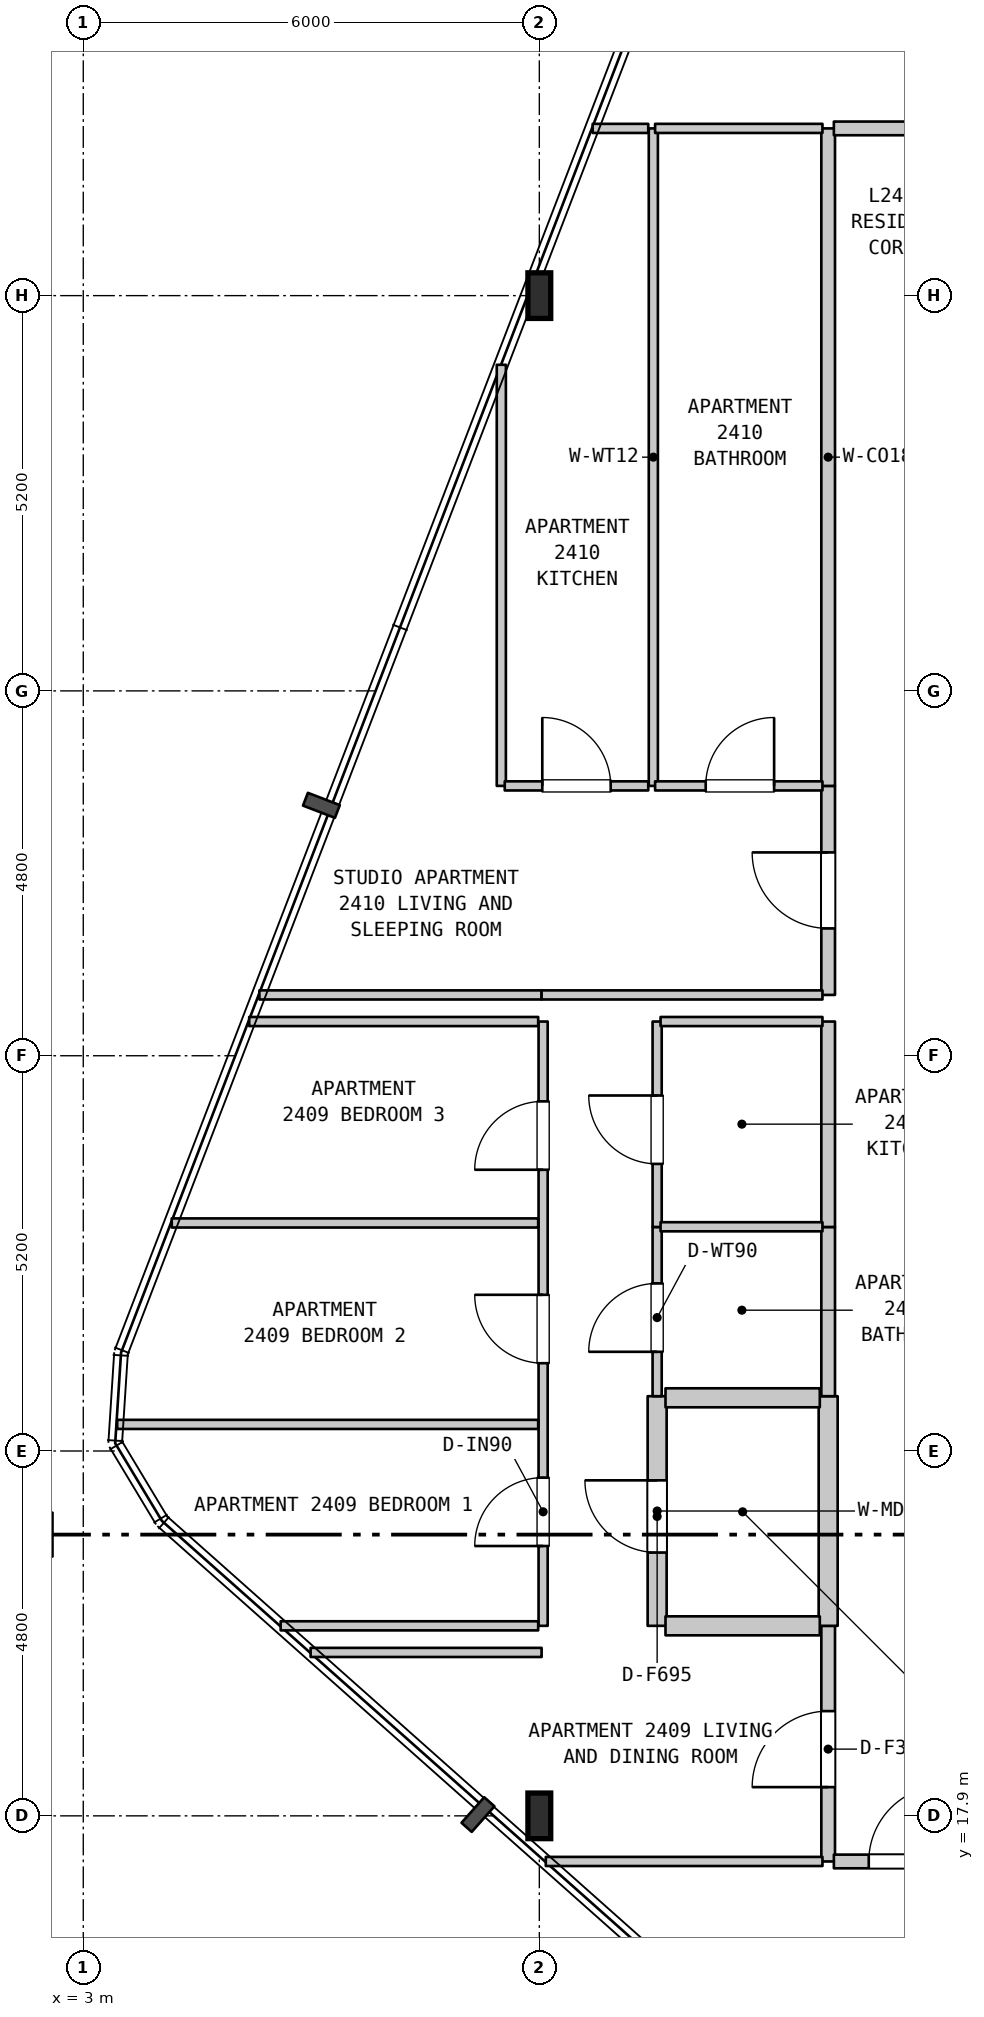
"""IFC4 building model, lengths in metres.
Left out: names, types, materials, properties, quantities, classifications, styles, units other than length and angle.
Written with IfcOpenShell. Run it as: python <this file> out.ifc"""

import sys

from ifc_helpers import new_model, si_unit, direction, frame, frame_2d, origin, origin_2d, place, context, subcontext, project, spatial, rectangle, i_section, extrude, element, fill, save


model = new_model("IFC4")
c1 = context("Model", 3, precision=1e-05, world=origin(), true_north=direction((0.0, 1.0)))
c2 = subcontext(c1, "Body", "Model", "MODEL_VIEW")
j1 = project(units=[si_unit("LENGTHUNIT", "METRE"), si_unit("PLANEANGLEUNIT", "RADIAN")], contexts=[c1])
p1 = place(None, origin())
s1 = spatial("IfcSite", under=j1, at=p1, CompositionType="ELEMENT")
p2 = place(p1, origin())
s2 = spatial("IfcBuilding", under=s1, at=p2, CompositionType="ELEMENT")
p3 = place(p2, frame((0.0, 0.0, 102.0)))
s3 = spatial("IfcBuildingStorey", under=s2, at=p3, CompositionType="ELEMENT", Elevation=102.0)
for number, where, z_axis, x_axis in (
    (1, (9.0, 17.9, 0.0), (0.0, 0.0, 1.0), (1.0, 0.0, 0.0)),
    (2, (9.0, 37.9, 0.0), (0.0, 0.0, 1.0), (1.0, 0.0, 0.0)),
):
    element("IfcColumn", number, at=place(p3, frame(where, z_axis=z_axis, x_axis=x_axis)), inside=s3, PredefinedType="COLUMN", context=c2, shape_type="SweptSolid", body=[
        extrude(i_section(OverallWidth=0.3, OverallDepth=0.6, WebThickness=0.015, FlangeThickness=0.03, FilletRadius=0.027, at=origin_2d()), origin(), (0.0, 0.0, 1.0), 3.7),
    ])
p4 = place(p3, frame((8.5, 31.45, 0.0), z_axis=(0.0, 0.0, 1.0), x_axis=(0.0, 1.0, 0.0)))
e3 = element("IfcWall", 3, at=p4, inside=s3, PredefinedType="PARTITIONING", context=c2, shape_type="SweptSolid", body=[
    extrude(rectangle(XDim=5.54, YDim=0.12, at=frame_2d((2.77, 0.0))), origin(), (0.0, 0.0, 1.0), 3.385),
])
p5 = place(p3, frame((9.05, 20.4, 0.0), z_axis=(0.0, 0.0, 1.0), x_axis=(0.0, 1.0, 0.0)))
e4 = element("IfcWall", 4, at=p5, inside=s3, PredefinedType="PARTITIONING", context=c2, shape_type="SweptSolid", body=[
    extrude(rectangle(XDim=7.95, YDim=0.12, at=frame_2d((3.975, 0.0))), origin(), (0.0, 0.0, 1.0), 2.785),
])
p6 = place(p5, frame((1.05, 0.0, 0.0)))
e5 = element("IfcOpeningElement", 5, at=p6, cuts=e4, PredefinedType="OPENING", context=c2, shape_type="SweptSolid", body=[
    extrude(rectangle(XDim=0.9, YDim=2.15, at=frame_2d((0.45, 1.075))), frame((0.0, 0.07, 0.0), z_axis=(0.0, -1.0, 0.0), x_axis=(1.0, 0.0, 0.0)), (0.0, 0.0, 1.0), 0.14),
])
p7 = place(p5, frame((3.455, 0.0, 0.0)))
e6 = element("IfcOpeningElement", 6, at=p7, cuts=e4, PredefinedType="OPENING", context=c2, shape_type="SweptSolid", body=[
    extrude(rectangle(XDim=0.9, YDim=2.15, at=frame_2d((0.45, 1.075))), frame((0.0, 0.07, 0.0), z_axis=(0.0, -1.0, 0.0), x_axis=(1.0, 0.0, 0.0)), (0.0, 0.0, 1.0), 0.14),
])
p8 = place(p5, frame((6.0, 0.0, 0.0)))
e7 = element("IfcOpeningElement", 7, at=p8, cuts=e4, PredefinedType="OPENING", context=c2, shape_type="SweptSolid", body=[
    extrude(rectangle(XDim=0.9, YDim=2.15, at=frame_2d((0.45, 1.075))), frame((0.0, 0.07, 0.0), z_axis=(0.0, -1.0, 0.0), x_axis=(1.0, 0.0, 0.0)), (0.0, 0.0, 1.0), 0.14),
])
p9 = place(p3, frame((10.5, 31.45, 0.0), z_axis=(0.0, 0.0, 1.0), x_axis=(0.0, 1.0, 0.0)))
e8 = element("IfcWall", 8, at=p9, inside=s3, PredefinedType="PARTITIONING", context=c2, shape_type="SweptSolid", body=[
    extrude(rectangle(XDim=8.65, YDim=0.12, at=frame_2d((4.325, 0.0))), origin(), (0.0, 0.0, 1.0), 3.385),
])
p10 = place(p3, frame((10.55, 20.4, 0.0), z_axis=(0.0, 0.0, 1.0), x_axis=(0.0, 1.0, 0.0)))
e9 = element("IfcWall", 9, at=p10, inside=s3, PredefinedType="STANDARD", context=c2, shape_type="SweptSolid", body=[
    extrude(rectangle(XDim=3.021, YDim=0.25, at=frame_2d((1.51, 0.0))), origin(), (0.0, 0.0, 1.0), 3.385),
])
p11 = place(p10, frame((0.964, 0.0, 0.0)))
e10 = element("IfcOpeningElement", 10, at=p11, cuts=e9, PredefinedType="OPENING", context=c2, shape_type="SweptSolid", body=[
    extrude(rectangle(XDim=0.95, YDim=2.15, at=frame_2d((0.475, 1.075))), frame((0.0, 0.135, 0.0), z_axis=(0.0, -1.0, 0.0), x_axis=(1.0, 0.0, 0.0)), (0.0, 0.0, 1.0), 0.27),
])
p12 = place(p3, frame((10.55, 23.421, 0.0), z_axis=(0.0, 0.0, 1.0), x_axis=(0.0, 1.0, 0.0)))
e11 = element("IfcWall", 11, at=p12, inside=s3, PredefinedType="PARTITIONING", context=c2, shape_type="SweptSolid", body=[
    extrude(rectangle(XDim=2.226, YDim=0.12, at=frame_2d((1.113, 0.0))), origin(), (0.0, 0.0, 1.0), 3.385),
])
p13 = place(p12, frame((0.584, 0.0, 0.0)))
e12 = element("IfcOpeningElement", 12, at=p13, cuts=e11, PredefinedType="OPENING", context=c2, shape_type="SweptSolid", body=[
    extrude(rectangle(XDim=0.9, YDim=2.1, at=frame_2d((0.45, 1.05))), frame((0.0, 0.07, 0.0), z_axis=(0.0, -1.0, 0.0), x_axis=(1.0, 0.0, 0.0)), (0.0, 0.0, 1.0), 0.14),
])
p14 = place(p3, frame((10.55, 25.647, 0.0), z_axis=(0.0, 0.0, 1.0), x_axis=(0.0, 1.0, 0.0)))
e13 = element("IfcWall", 13, at=p14, inside=s3, PredefinedType="PARTITIONING", context=c2, shape_type="SweptSolid", body=[
    extrude(rectangle(XDim=2.703, YDim=0.12, at=frame_2d((1.352, 0.0))), origin(), (0.0, 0.0, 1.0), 3.385),
])
p15 = place(p14, frame((0.83, 0.0, 0.0)))
e14 = element("IfcOpeningElement", 14, at=p15, cuts=e13, PredefinedType="OPENING", context=c2, shape_type="SweptSolid", body=[
    extrude(rectangle(XDim=0.9, YDim=2.15, at=frame_2d((0.45, 1.075))), frame((0.0, 0.07, 0.0), z_axis=(0.0, -1.0, 0.0), x_axis=(1.0, 0.0, 0.0)), (0.0, 0.0, 1.0), 0.14),
])
p16 = place(p3, frame((12.8, 17.3, 0.0), z_axis=(0.0, 0.0, 1.0), x_axis=(0.0, 1.0, 0.0)))
e15 = element("IfcWall", 15, at=p16, inside=s3, PredefinedType="STANDARD", context=c2, shape_type="SweptSolid", body=[
    extrude(rectangle(XDim=3.1, YDim=0.18, at=frame_2d((1.55, 0.0))), origin(), (0.0, 0.0, 1.0), 3.385),
])
p17 = place(p16, frame((0.978, 0.0, 0.0)))
e16 = element("IfcOpeningElement", 16, at=p17, cuts=e15, PredefinedType="OPENING", context=c2, shape_type="SweptSolid", body=[
    extrude(rectangle(XDim=1.0, YDim=2.15, at=frame_2d((0.5, 1.075))), frame((0.0, 0.1, 0.0), z_axis=(0.0, -1.0, 0.0), x_axis=(1.0, 0.0, 0.0)), (0.0, 0.0, 1.0), 0.2),
])
p18 = place(p3, frame((12.8, 20.4, 0.0), z_axis=(0.0, 0.0, 1.0), x_axis=(0.0, 1.0, 0.0)))
e17 = element("IfcWall", 17, at=p18, inside=s3, PredefinedType="STANDARD", context=c2, shape_type="SweptSolid", body=[
    extrude(rectangle(XDim=3.021, YDim=0.25, at=frame_2d((1.51, 0.0))), origin(), (0.0, 0.0, 1.0), 3.385),
])
p19 = place(p3, frame((12.8, 23.421, 0.0), z_axis=(0.0, 0.0, 1.0), x_axis=(0.0, 1.0, 0.0)))
e18 = element("IfcWall", 18, at=p19, inside=s3, PredefinedType="STANDARD", context=c2, shape_type="SweptSolid", body=[
    extrude(rectangle(XDim=2.226, YDim=0.18, at=frame_2d((1.113, 0.0))), origin(), (0.0, 0.0, 1.0), 3.385),
])
p20 = place(p3, frame((12.8, 25.647, 0.0), z_axis=(0.0, 0.0, 1.0), x_axis=(0.0, 1.0, 0.0)))
e19 = element("IfcWall", 19, at=p20, inside=s3, PredefinedType="STANDARD", context=c2, shape_type="SweptSolid", body=[
    extrude(rectangle(XDim=2.703, YDim=0.18, at=frame_2d((1.352, 0.0))), origin(), (0.0, 0.0, 1.0), 3.385),
])
p21 = place(p3, frame((12.8, 28.7, 0.0), z_axis=(0.0, 0.0, 1.0), x_axis=(0.0, 1.0, 0.0)))
e20 = element("IfcWall", 20, at=p21, inside=s3, PredefinedType="STANDARD", context=c2, shape_type="SweptSolid", body=[
    extrude(rectangle(XDim=2.75, YDim=0.18, at=frame_2d((1.375, 0.0))), origin(), (0.0, 0.0, 1.0), 3.385),
])
p22 = place(p21, frame((0.875, 0.0, 0.0)))
e21 = element("IfcOpeningElement", 21, at=p22, cuts=e20, PredefinedType="OPENING", context=c2, shape_type="SweptSolid", body=[
    extrude(rectangle(XDim=1.0, YDim=2.15, at=frame_2d((0.5, 1.075))), frame((0.0, 0.1, 0.0), z_axis=(0.0, -1.0, 0.0), x_axis=(1.0, 0.0, 0.0)), (0.0, 0.0, 1.0), 0.2),
])
p23 = place(p3, frame((12.8, 31.45, 0.0), z_axis=(0.0, 0.0, 1.0), x_axis=(0.0, 1.0, 0.0)))
e22 = element("IfcWall", 22, at=p23, inside=s3, PredefinedType="STANDARD", context=c2, shape_type="SweptSolid", body=[
    extrude(rectangle(XDim=8.65, YDim=0.18, at=frame_2d((4.325, 0.0))), origin(), (0.0, 0.0, 1.0), 3.385),
])
p24 = place(p3, frame((9.085, 17.3, 0.0), z_axis=(0.0, 0.0, 1.0), x_axis=(1.0, 0.0, 0.0)))
e23 = element("IfcWall", 23, at=p24, inside=s3, PredefinedType="PARTITIONING", context=c2, shape_type="SweptSolid", body=[
    extrude(rectangle(XDim=3.64, YDim=0.12, at=frame_2d((1.82, 0.0))), origin(), (0.0, 0.0, 1.0), 3.385),
])
p25 = place(p3, frame((12.875, 17.3, 0.0), z_axis=(0.0, 0.0, 1.0), x_axis=(1.0, 0.0, 0.0)))
e24 = element("IfcWall", 24, at=p25, inside=s3, PredefinedType="STANDARD", context=c2, shape_type="SweptSolid", body=[
    extrude(rectangle(XDim=3.5, YDim=0.18, at=frame_2d((1.75, 0.0))), origin(), (0.0, 0.0, 1.0), 3.385),
])
p26 = place(p25, frame((0.459, 0.0, 0.0)))
e25 = element("IfcOpeningElement", 25, at=p26, cuts=e24, PredefinedType="OPENING", context=c2, shape_type="SweptSolid", body=[
    extrude(rectangle(XDim=1.0, YDim=2.15, at=frame_2d((0.5, 1.075))), frame((0.0, 0.1, 0.0), z_axis=(0.0, -1.0, 0.0), x_axis=(1.0, 0.0, 0.0)), (0.0, 0.0, 1.0), 0.2),
])
p27 = place(p3, frame((5.991, 20.05, 0.0), z_axis=(0.0, 0.0, 1.0), x_axis=(1.0, 0.0, 0.0)))
e26 = element("IfcWall", 26, at=p27, inside=s3, PredefinedType="PARTITIONING", context=c2, shape_type="SweptSolid", body=[
    extrude(rectangle(XDim=3.039, YDim=0.12, at=frame_2d((1.52, 0.0))), origin(), (0.0, 0.0, 1.0), 3.385),
])
p28 = place(p3, frame((5.597, 20.4, 0.0), z_axis=(0.0, 0.0, 1.0), x_axis=(1.0, 0.0, 0.0)))
e27 = element("IfcWall", 27, at=p28, inside=s3, PredefinedType="PARTITIONING", context=c2, shape_type="SweptSolid", body=[
    extrude(rectangle(XDim=3.388, YDim=0.12, at=frame_2d((1.694, 0.0))), origin(), (0.0, 0.0, 1.0), 3.385),
])
p29 = place(p3, frame((10.66, 20.4, 0.0), z_axis=(0.0, 0.0, 1.0), x_axis=(1.0, 0.0, 0.0)))
e28 = element("IfcWall", 28, at=p29, inside=s3, PredefinedType="STANDARD", context=c2, shape_type="SweptSolid", body=[
    extrude(rectangle(XDim=2.03, YDim=0.25, at=frame_2d((1.015, 0.0))), origin(), (0.0, 0.0, 1.0), 3.385),
])
p30 = place(p3, frame((3.446, 23.05, 0.0), z_axis=(0.0, 0.0, 1.0), x_axis=(1.0, 0.0, 0.0)))
e29 = element("IfcWall", 29, at=p30, inside=s3, PredefinedType="PARTITIONING", context=c2, shape_type="SweptSolid", body=[
    extrude(rectangle(XDim=5.539, YDim=0.12, at=frame_2d((2.77, 0.0))), origin(), (0.0, 0.0, 1.0), 3.385),
])
p31 = place(p3, frame((10.66, 23.4, 0.0), z_axis=(0.0, 0.0, 1.0), x_axis=(1.0, 0.0, 0.0)))
e30 = element("IfcWall", 30, at=p31, inside=s3, PredefinedType="STANDARD", context=c2, shape_type="SweptSolid", body=[
    extrude(rectangle(XDim=2.03, YDim=0.25, at=frame_2d((1.015, 0.0))), origin(), (0.0, 0.0, 1.0), 3.385),
])
p32 = place(p3, frame((10.595, 25.65, 0.0), z_axis=(0.0, 0.0, 1.0), x_axis=(1.0, 0.0, 0.0)))
e31 = element("IfcWall", 31, at=p32, inside=s3, PredefinedType="PARTITIONING", context=c2, shape_type="SweptSolid", body=[
    extrude(rectangle(XDim=2.13, YDim=0.12, at=frame_2d((1.065, 0.0))), origin(), (0.0, 0.0, 1.0), 3.385),
])
p33 = place(p3, frame((4.164, 25.7, 0.0), z_axis=(0.0, 0.0, 1.0), x_axis=(1.0, 0.0, 0.0)))
e32 = element("IfcWall", 32, at=p33, inside=s3, PredefinedType="PARTITIONING", context=c2, shape_type="SweptSolid", body=[
    extrude(rectangle(XDim=4.821, YDim=0.12, at=frame_2d((2.411, 0.0))), origin(), (0.0, 0.0, 1.0), 3.385),
])
p34 = place(p3, frame((5.183, 28.35, 0.0), z_axis=(0.0, 0.0, 1.0), x_axis=(1.0, 0.0, 0.0)))
e33 = element("IfcWall", 33, at=p34, inside=s3, PredefinedType="PARTITIONING", context=c2, shape_type="SweptSolid", body=[
    extrude(rectangle(XDim=3.802, YDim=0.12, at=frame_2d((1.901, 0.0))), origin(), (0.0, 0.0, 1.0), 3.385),
])
p35 = place(p3, frame((10.595, 28.35, 0.0), z_axis=(0.0, 0.0, 1.0), x_axis=(1.0, 0.0, 0.0)))
e34 = element("IfcWall", 34, at=p35, inside=s3, PredefinedType="PARTITIONING", context=c2, shape_type="SweptSolid", body=[
    extrude(rectangle(XDim=2.13, YDim=0.12, at=frame_2d((1.065, 0.0))), origin(), (0.0, 0.0, 1.0), 3.385),
])
p36 = place(p3, frame((5.317, 28.7, 0.0), z_axis=(0.0, 0.0, 1.0), x_axis=(1.0, 0.0, 0.0)))
e35 = element("IfcWall", 35, at=p36, inside=s3, PredefinedType="PARTITIONING", context=c2, shape_type="SweptSolid", body=[
    extrude(rectangle(XDim=3.713, YDim=0.12, at=frame_2d((1.856, 0.0))), origin(), (0.0, 0.0, 1.0), 3.385),
])
p37 = place(p3, frame((9.03, 28.7, 0.0), z_axis=(0.0, 0.0, 1.0), x_axis=(1.0, 0.0, 0.0)))
e36 = element("IfcWall", 36, at=p37, inside=s3, PredefinedType="PARTITIONING", context=c2, shape_type="SweptSolid", body=[
    extrude(rectangle(XDim=3.695, YDim=0.12, at=frame_2d((1.848, 0.0))), origin(), (0.0, 0.0, 1.0), 3.385),
])
p38 = place(p3, frame((8.545, 31.45, 0.0), z_axis=(0.0, 0.0, 1.0), x_axis=(1.0, 0.0, 0.0)))
e37 = element("IfcWall", 37, at=p38, inside=s3, PredefinedType="PARTITIONING", context=c2, shape_type="SweptSolid", body=[
    extrude(rectangle(XDim=1.888, YDim=0.12, at=frame_2d((0.944, 0.0))), origin(), (0.0, 0.0, 1.0), 3.385),
])
p39 = place(p38, frame((0.494, 0.0, 0.0)))
e38 = element("IfcOpeningElement", 38, at=p39, cuts=e37, PredefinedType="OPENING", context=c2, shape_type="SweptSolid", body=[
    extrude(rectangle(XDim=0.9, YDim=2.15, at=frame_2d((0.45, 1.075))), frame((0.0, 0.07, 0.0), z_axis=(0.0, -1.0, 0.0), x_axis=(1.0, 0.0, 0.0)), (0.0, 0.0, 1.0), 0.14),
])
p40 = place(p3, frame((10.523, 31.45, 0.0), z_axis=(0.0, 0.0, 1.0), x_axis=(1.0, 0.0, 0.0)))
e39 = element("IfcWall", 39, at=p40, inside=s3, PredefinedType="PARTITIONING", context=c2, shape_type="SweptSolid", body=[
    extrude(rectangle(XDim=2.202, YDim=0.12, at=frame_2d((1.101, 0.0))), origin(), (0.0, 0.0, 1.0), 3.385),
])
p41 = place(p40, frame((0.666, 0.0, 0.0)))
e40 = element("IfcOpeningElement", 40, at=p41, cuts=e39, PredefinedType="OPENING", context=c2, shape_type="SweptSolid", body=[
    extrude(rectangle(XDim=0.9, YDim=2.1, at=frame_2d((0.45, 1.05))), frame((0.0, 0.07, 0.0), z_axis=(0.0, -1.0, 0.0), x_axis=(1.0, 0.0, 0.0)), (0.0, 0.0, 1.0), 0.14),
])
p42 = place(p3, frame((9.702, 40.1, 0.0), z_axis=(0.0, 0.0, 1.0), x_axis=(1.0, 0.0, 0.0)))
e41 = element("IfcWall", 41, at=p42, inside=s3, PredefinedType="PARTITIONING", context=c2, shape_type="SweptSolid", body=[
    extrude(rectangle(XDim=0.731, YDim=0.12, at=frame_2d((0.366, 0.0))), origin(), (0.0, 0.0, 1.0), 3.385),
])
p43 = place(p3, frame((10.523, 40.1, 0.0), z_axis=(0.0, 0.0, 1.0), x_axis=(1.0, 0.0, 0.0)))
e42 = element("IfcWall", 42, at=p43, inside=s3, PredefinedType="PARTITIONING", context=c2, shape_type="SweptSolid", body=[
    extrude(rectangle(XDim=2.202, YDim=0.12, at=frame_2d((1.101, 0.0))), origin(), (0.0, 0.0, 1.0), 3.385),
])
p44 = place(p3, frame((12.875, 40.1, 0.0), z_axis=(0.0, 0.0, 1.0), x_axis=(1.0, 0.0, 0.0)))
e43 = element("IfcWall", 43, at=p44, inside=s3, PredefinedType="STANDARD", context=c2, shape_type="SweptSolid", body=[
    extrude(rectangle(XDim=5.59, YDim=0.18, at=frame_2d((2.795, 0.0))), origin(), (0.0, 0.0, 1.0), 3.385),
])
p45 = place(p44, frame((2.28, 0.0, 0.0)))
e44 = element("IfcOpeningElement", 44, at=p45, cuts=e43, PredefinedType="OPENING", context=c2, shape_type="SweptSolid", body=[
    extrude(rectangle(XDim=1.0, YDim=2.15, at=frame_2d((0.5, 1.075))), frame((0.0, 0.1, 0.0), z_axis=(0.0, -1.0, 0.0), x_axis=(1.0, 0.0, 0.0)), (0.0, 0.0, 1.0), 0.2),
])
p46 = place(p6, origin())
e45 = element("IfcDoor", 45, at=p46, inside=s3, OperationType="SINGLE_SWING_LEFT", PredefinedType="DOOR", context=c2, shape_type="SweptSolid", body=[
    extrude(rectangle(XDim=0.9, YDim=2.15, at=frame_2d((0.45, 1.075))), frame((0.0, 0.025, 0.0), z_axis=(0.0, -1.0, 0.0), x_axis=(1.0, 0.0, 0.0)), (0.0, 0.0, 1.0), 0.05),
])
fill(e5, e45)
p47 = place(p7, origin())
e46 = element("IfcDoor", 46, at=p47, inside=s3, OperationType="SINGLE_SWING_RIGHT", PredefinedType="DOOR", context=c2, shape_type="SweptSolid", body=[
    extrude(rectangle(XDim=0.9, YDim=2.15, at=frame_2d((0.45, 1.075))), frame((0.0, 0.025, 0.0), z_axis=(0.0, -1.0, 0.0), x_axis=(1.0, 0.0, 0.0)), (0.0, 0.0, 1.0), 0.05),
])
fill(e6, e46)
p48 = place(p8, origin())
e47 = element("IfcDoor", 47, at=p48, inside=s3, OperationType="SINGLE_SWING_LEFT", PredefinedType="DOOR", context=c2, shape_type="SweptSolid", body=[
    extrude(rectangle(XDim=0.9, YDim=2.15, at=frame_2d((0.45, 1.075))), frame((0.0, 0.025, 0.0), z_axis=(0.0, -1.0, 0.0), x_axis=(1.0, 0.0, 0.0)), (0.0, 0.0, 1.0), 0.05),
])
fill(e7, e47)
p49 = place(p11, origin())
e48 = element("IfcDoor", 48, at=p49, inside=s3, OperationType="SINGLE_SWING_RIGHT", PredefinedType="DOOR", context=c2, shape_type="SweptSolid", body=[
    extrude(rectangle(XDim=0.95, YDim=2.15, at=frame_2d((0.475, 1.075))), frame((0.0, 0.025, 0.0), z_axis=(0.0, -1.0, 0.0), x_axis=(1.0, 0.0, 0.0)), (0.0, 0.0, 1.0), 0.05),
])
fill(e10, e48)
p50 = place(p13, origin())
e49 = element("IfcDoor", 49, at=p50, inside=s3, OperationType="SINGLE_SWING_LEFT", PredefinedType="DOOR", context=c2, shape_type="SweptSolid", body=[
    extrude(rectangle(XDim=0.9, YDim=2.1, at=frame_2d((0.45, 1.05))), frame((0.0, 0.025, 0.0), z_axis=(0.0, -1.0, 0.0), x_axis=(1.0, 0.0, 0.0)), (0.0, 0.0, 1.0), 0.05),
])
fill(e12, e49)
p51 = place(p15, origin())
e50 = element("IfcDoor", 50, at=p51, inside=s3, OperationType="SINGLE_SWING_RIGHT", PredefinedType="DOOR", context=c2, shape_type="SweptSolid", body=[
    extrude(rectangle(XDim=0.9, YDim=2.15, at=frame_2d((0.45, 1.075))), frame((0.0, 0.025, 0.0), z_axis=(0.0, -1.0, 0.0), x_axis=(1.0, 0.0, 0.0)), (0.0, 0.0, 1.0), 0.05),
])
fill(e14, e50)
p52 = place(p17, origin())
e51 = element("IfcDoor", 51, at=p52, inside=s3, OperationType="SINGLE_SWING_LEFT", PredefinedType="DOOR", context=c2, shape_type="SweptSolid", body=[
    extrude(rectangle(XDim=1.0, YDim=2.15, at=frame_2d((0.5, 1.075))), frame((0.0, 0.025, 0.0), z_axis=(0.0, -1.0, 0.0), x_axis=(1.0, 0.0, 0.0)), (0.0, 0.0, 1.0), 0.05),
])
fill(e16, e51)
p53 = place(p22, origin())
e52 = element("IfcDoor", 52, at=p53, inside=s3, OperationType="SINGLE_SWING_RIGHT", PredefinedType="DOOR", context=c2, shape_type="SweptSolid", body=[
    extrude(rectangle(XDim=1.0, YDim=2.15, at=frame_2d((0.5, 1.075))), frame((0.0, 0.025, 0.0), z_axis=(0.0, -1.0, 0.0), x_axis=(1.0, 0.0, 0.0)), (0.0, 0.0, 1.0), 0.05),
])
fill(e21, e52)
p54 = place(p26, origin())
e53 = element("IfcDoor", 53, at=p54, inside=s3, OperationType="SINGLE_SWING_RIGHT", PredefinedType="DOOR", context=c2, shape_type="SweptSolid", body=[
    extrude(rectangle(XDim=1.0, YDim=2.15, at=frame_2d((0.5, 1.075))), frame((0.0, 0.025, 0.0), z_axis=(0.0, -1.0, 0.0), x_axis=(1.0, 0.0, 0.0)), (0.0, 0.0, 1.0), 0.05),
])
fill(e25, e53)
p55 = place(p39, origin())
e54 = element("IfcDoor", 54, at=p55, inside=s3, OperationType="SINGLE_SWING_LEFT", PredefinedType="DOOR", context=c2, shape_type="SweptSolid", body=[
    extrude(rectangle(XDim=0.9, YDim=2.15, at=frame_2d((0.45, 1.075))), frame((0.0, 0.025, 0.0), z_axis=(0.0, -1.0, 0.0), x_axis=(1.0, 0.0, 0.0)), (0.0, 0.0, 1.0), 0.05),
])
fill(e38, e54)
p56 = place(p41, origin())
e55 = element("IfcDoor", 55, at=p56, inside=s3, OperationType="SINGLE_SWING_RIGHT", PredefinedType="DOOR", context=c2, shape_type="SweptSolid", body=[
    extrude(rectangle(XDim=0.9, YDim=2.1, at=frame_2d((0.45, 1.05))), frame((0.0, 0.025, 0.0), z_axis=(0.0, -1.0, 0.0), x_axis=(1.0, 0.0, 0.0)), (0.0, 0.0, 1.0), 0.05),
])
fill(e40, e55)
save(model, sys.argv[1])
